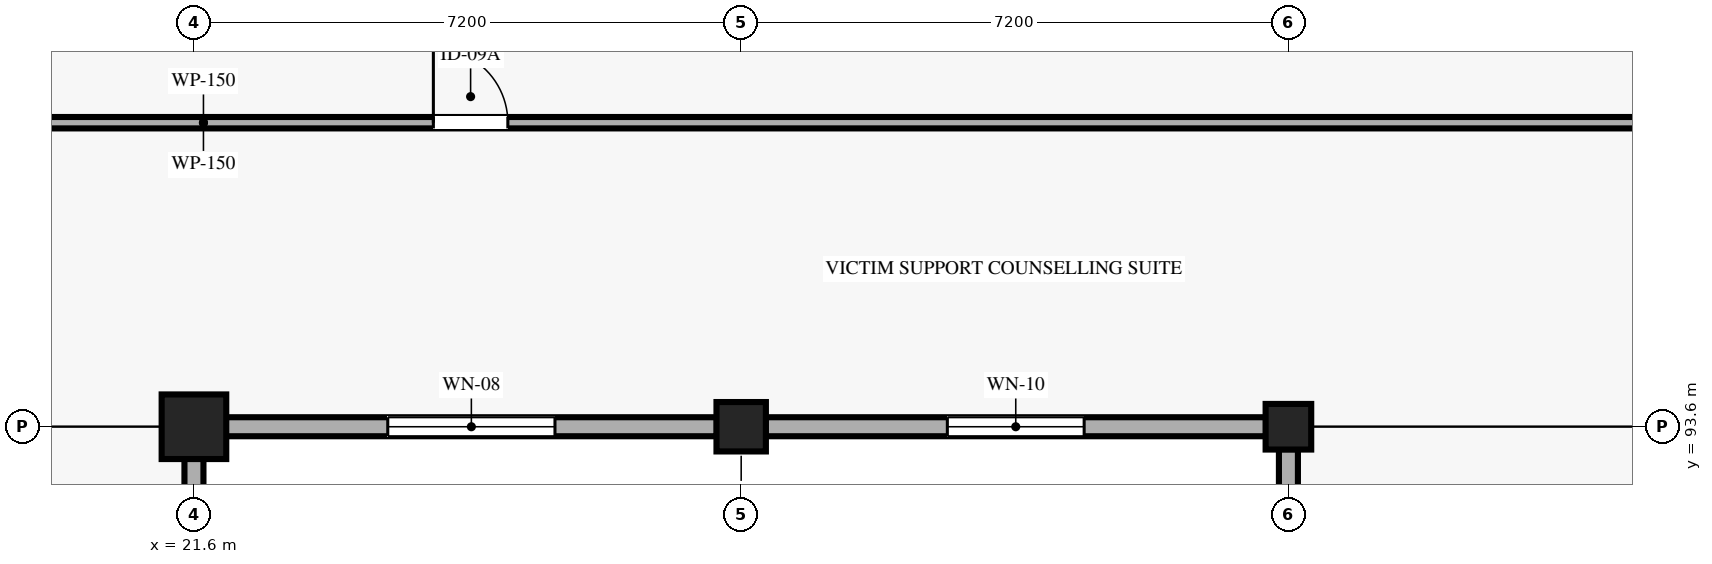
"""IFC4 building model, lengths in metres.
Left out: names, types, materials, properties, quantities, classifications, styles, units other than length and angle.
Written with IfcOpenShell. Run it as: python <this file> out.ifc"""

import sys

from ifc_helpers import new_model, si_unit, direction, frame, frame_2d, origin, origin_2d, place, context, subcontext, project, spatial, rectangle, extrude, element, fill, save


model = new_model("IFC4")
c1 = context("Model", 3, precision=1e-05, world=origin(), true_north=direction((0.0, 1.0)))
c2 = subcontext(c1, "Body", "Model", "MODEL_VIEW")
j1 = project(units=[si_unit("LENGTHUNIT", "METRE"), si_unit("PLANEANGLEUNIT", "RADIAN")], contexts=[c1])
p1 = place(None, origin())
s1 = spatial("IfcSite", under=j1, at=p1, CompositionType="ELEMENT")
p2 = place(p1, origin())
s2 = spatial("IfcBuilding", under=s1, at=p2, CompositionType="ELEMENT")
p3 = place(p2, frame((0.0, 0.0, 5.4)))
s3 = spatial("IfcBuildingStorey", under=s2, at=p3, CompositionType="ELEMENT", Elevation=5.4)
p4 = place(p3, frame((21.6, 93.6, 0.0), z_axis=(0.0, 0.0, 1.0), x_axis=(1.0, 0.0, 0.0)))
e1 = element("IfcColumn", 1, at=p4, inside=s3, PredefinedType="COLUMN", context=c2, shape_type="SweptSolid", body=[
    extrude(rectangle(XDim=0.85, YDim=0.85, at=origin_2d()), origin(), (0.0, 0.0, 1.0), 4.05),
])
p5 = place(p3, frame((28.8, 93.6, 0.0), z_axis=(0.0, 0.0, 1.0), x_axis=(1.0, 0.0, 0.0)))
e2 = element("IfcColumn", 2, at=p5, inside=s3, PredefinedType="COLUMN", context=c2, shape_type="SweptSolid", body=[
    extrude(rectangle(XDim=0.65, YDim=0.65, at=origin_2d()), origin(), (0.0, 0.0, 1.0), 4.05),
])
p6 = place(p3, frame((36.0, 93.6, 0.0), z_axis=(0.0, 0.0, 1.0), x_axis=(1.0, 0.0, 0.0)))
e3 = element("IfcColumn", 3, at=p6, inside=s3, PredefinedType="COLUMN", context=c2, shape_type="SweptSolid", body=[
    extrude(rectangle(XDim=0.6, YDim=0.6, at=origin_2d()), origin(), (0.0, 0.0, 1.0), 4.05),
])
p7 = place(p3, frame((22.02, 93.6, 0.0), z_axis=(0.0, 0.0, 1.0), x_axis=(1.0, 0.0, 0.0)))
e4 = element("IfcWall", 4, at=p7, inside=s3, PredefinedType="SOLIDWALL", context=c2, shape_type="SweptSolid", body=[
    extrude(rectangle(XDim=6.46, YDim=0.25, at=frame_2d((3.23, 0.0))), origin(), (0.0, 0.0, 1.0), 3.195),
])
p8 = place(p7, frame((2.13, 0.0, 0.85)))
e5 = element("IfcOpeningElement", 5, at=p8, cuts=e4, PredefinedType="OPENING", context=c2, shape_type="SweptSolid", body=[
    extrude(rectangle(XDim=2.2, YDim=1.7, at=frame_2d((1.1, 0.85))), frame((0.0, 0.135, 0.0), z_axis=(0.0, -1.0, 0.0), x_axis=(1.0, 0.0, 0.0)), (0.0, 0.0, 1.0), 0.27),
])
p9 = place(p3, frame((29.12, 93.6, 0.0), z_axis=(0.0, 0.0, 1.0), x_axis=(1.0, 0.0, 0.0)))
e6 = element("IfcWall", 6, at=p9, inside=s3, PredefinedType="SOLIDWALL", context=c2, shape_type="SweptSolid", body=[
    extrude(rectangle(XDim=6.585, YDim=0.25, at=frame_2d((3.292, 0.0))), origin(), (0.0, 0.0, 1.0), 3.195),
])
p10 = place(p9, frame((2.393, 0.0, 0.85)))
e7 = element("IfcOpeningElement", 7, at=p10, cuts=e6, PredefinedType="OPENING", context=c2, shape_type="SweptSolid", body=[
    extrude(rectangle(XDim=1.8, YDim=1.6, at=frame_2d((0.9, 0.8))), frame((0.0, 0.135, 0.0), z_axis=(0.0, -1.0, 0.0), x_axis=(1.0, 0.0, 0.0)), (0.0, 0.0, 1.0), 0.27),
])
p11 = place(p3, frame((21.6, 86.82, 0.0), z_axis=(0.0, 0.0, 1.0), x_axis=(0.0, 1.0, 0.0)))
e8 = element("IfcWall", 8, at=p11, inside=s3, PredefinedType="SOLIDWALL", context=c2, shape_type="SweptSolid", body=[
    extrude(rectangle(XDim=6.36, YDim=0.25, at=frame_2d((3.18, 0.0))), origin(), (0.0, 0.0, 1.0), 3.195),
])
p12 = place(p11, frame((1.98, 0.0, 0.85)))
e9 = element("IfcOpeningElement", 9, at=p12, cuts=e8, PredefinedType="OPENING", context=c2, shape_type="SweptSolid", body=[
    extrude(rectangle(XDim=2.4, YDim=1.75, at=frame_2d((1.2, 0.875))), frame((0.0, 0.135, 0.0), z_axis=(0.0, -1.0, 0.0), x_axis=(1.0, 0.0, 0.0)), (0.0, 0.0, 1.0), 0.27),
])
p13 = place(p3, frame((36.0, 86.645, 0.0), z_axis=(0.0, 0.0, 1.0), x_axis=(0.0, 1.0, 0.0)))
e10 = element("IfcWall", 10, at=p13, inside=s3, PredefinedType="SOLIDWALL", context=c2, shape_type="SweptSolid", body=[
    extrude(rectangle(XDim=6.66, YDim=0.25, at=frame_2d((3.33, 0.0))), origin(), (0.0, 0.0, 1.0), 3.2),
])
p14 = place(p13, frame((2.505, 0.0, 0.85)))
e11 = element("IfcOpeningElement", 11, at=p14, cuts=e10, PredefinedType="OPENING", context=c2, shape_type="SweptSolid", body=[
    extrude(rectangle(XDim=1.65, YDim=1.55, at=frame_2d((0.825, 0.775))), frame((0.0, 0.135, 0.0), z_axis=(0.0, -1.0, 0.0), x_axis=(1.0, 0.0, 0.0)), (0.0, 0.0, 1.0), 0.27),
])
p15 = place(p3, frame((0.65, 97.6, 0.0), z_axis=(0.0, 0.0, 1.0), x_axis=(1.0, 0.0, 0.0)))
e12 = element("IfcWall", 12, at=p15, inside=s3, PredefinedType="PARTITIONING", context=c2, shape_type="SweptSolid", body=[
    extrude(rectangle(XDim=42.15, YDim=0.15, at=frame_2d((21.075, 0.0))), origin(), (0.0, 0.0, 1.0), 3.81),
])
p16 = place(p15, frame((24.1, 0.0, 0.0)))
e13 = element("IfcOpeningElement", 13, at=p16, cuts=e12, PredefinedType="OPENING", context=c2, shape_type="SweptSolid", body=[
    extrude(rectangle(XDim=0.98, YDim=2.1, at=frame_2d((0.49, 1.05))), frame((0.0, 0.085, 0.0), z_axis=(0.0, -1.0, 0.0), x_axis=(1.0, 0.0, 0.0)), (0.0, 0.0, 1.0), 0.17),
])
p17 = place(p8, origin())
e14 = element("IfcWindow", 14, at=p17, inside=s3, PartitioningType="SINGLE_PANEL", PredefinedType="WINDOW", context=c2, shape_type="SweptSolid", body=[
    extrude(rectangle(XDim=2.2, YDim=1.7, at=frame_2d((1.1, 0.85))), frame((0.0, 0.03, 0.0), z_axis=(0.0, -1.0, 0.0), x_axis=(1.0, 0.0, 0.0)), (0.0, 0.0, 1.0), 0.06),
])
fill(e5, e14)
p18 = place(p10, origin())
e15 = element("IfcWindow", 15, at=p18, inside=s3, PartitioningType="SINGLE_PANEL", PredefinedType="WINDOW", context=c2, shape_type="SweptSolid", body=[
    extrude(rectangle(XDim=1.8, YDim=1.6, at=frame_2d((0.9, 0.8))), frame((0.0, 0.03, 0.0), z_axis=(0.0, -1.0, 0.0), x_axis=(1.0, 0.0, 0.0)), (0.0, 0.0, 1.0), 0.06),
])
fill(e7, e15)
p19 = place(p16, origin())
e16 = element("IfcDoor", 16, at=p19, inside=s3, OperationType="SINGLE_SWING_LEFT", PredefinedType="DOOR", context=c2, shape_type="SweptSolid", body=[
    extrude(rectangle(XDim=0.98, YDim=2.1, at=frame_2d((0.49, 1.05))), frame((0.0, 0.025, 0.0), z_axis=(0.0, -1.0, 0.0), x_axis=(1.0, 0.0, 0.0)), (0.0, 0.0, 1.0), 0.05),
])
fill(e13, e16)
save(model, sys.argv[1])
